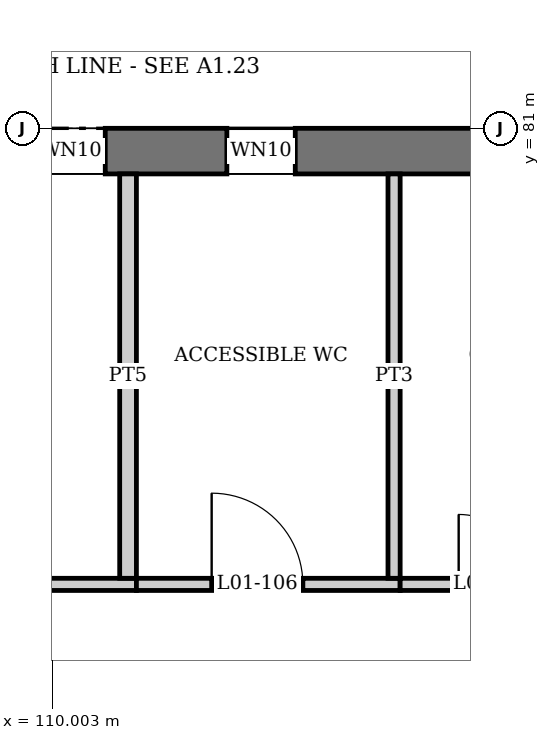
"""IFC4 building model, lengths in metres.
Left out: names, types, materials, properties, quantities, classifications, styles, units other than length and angle.
Written with IfcOpenShell. Run it as: python <this file> out.ifc"""

import sys

from ifc_helpers import new_model, si_unit, direction, frame, frame_2d, origin, place, context, subcontext, project, spatial, rectangle, extrude, element, fill, save


model = new_model("IFC4")
c1 = context("Model", 3, precision=1e-05, world=origin(), true_north=direction((0.0, 1.0)))
c2 = subcontext(c1, "Body", "Model", "MODEL_VIEW")
j1 = project(units=[si_unit("LENGTHUNIT", "METRE"), si_unit("PLANEANGLEUNIT", "RADIAN")], contexts=[c1])
p1 = place(None, origin())
s1 = spatial("IfcSite", under=j1, at=p1, CompositionType="ELEMENT")
p2 = place(p1, origin())
s2 = spatial("IfcBuilding", under=s1, at=p2, CompositionType="ELEMENT")
p3 = place(p2, frame((0.0, 0.0, 6.0)))
s3 = spatial("IfcBuildingStorey", under=s2, at=p3, CompositionType="ELEMENT", Elevation=6.0)
p4 = place(p3, frame((0.0, 80.7, 0.0), z_axis=(0.0, 0.0, 1.0), x_axis=(1.0, 0.0, 0.0)))
e1 = element("IfcWall", 1, at=p4, inside=s3, PredefinedType="SHEAR", context=c2, shape_type="SweptSolid", body=[
    extrude(rectangle(XDim=180.0, YDim=0.6, at=frame_2d((90.0, 0.0))), origin(), (0.0, 0.0, 1.0), 4.5),
])
p5 = place(p4, frame((0.9, 0.0, 0.6)))
e2 = element("IfcOpeningElement", 2, at=p5, cuts=e1, PredefinedType="OPENING", context=c2, shape_type="SweptSolid", body=[
    extrude(rectangle(XDim=2.7, YDim=2.7, at=frame_2d((1.35, 1.35))), frame((0.0, 0.31, 0.0), z_axis=(0.0, -1.0, 0.0), x_axis=(1.0, 0.0, 0.0)), (0.0, 0.0, 1.0), 0.62),
])
p6 = place(p4, frame((5.4, 0.0, 0.6)))
e3 = element("IfcOpeningElement", 3, at=p6, cuts=e1, PredefinedType="OPENING", context=c2, shape_type="SweptSolid", body=[
    extrude(rectangle(XDim=2.7, YDim=2.7, at=frame_2d((1.35, 1.35))), frame((0.0, 0.31, 0.0), z_axis=(0.0, -1.0, 0.0), x_axis=(1.0, 0.0, 0.0)), (0.0, 0.0, 1.0), 0.62),
])
p7 = place(p4, frame((9.9, 0.0, 0.6)))
e4 = element("IfcOpeningElement", 4, at=p7, cuts=e1, PredefinedType="OPENING", context=c2, shape_type="SweptSolid", body=[
    extrude(rectangle(XDim=2.7, YDim=2.7, at=frame_2d((1.35, 1.35))), frame((0.0, 0.31, 0.0), z_axis=(0.0, -1.0, 0.0), x_axis=(1.0, 0.0, 0.0)), (0.0, 0.0, 1.0), 0.62),
])
p8 = place(p4, frame((14.4, 0.0, 0.6)))
e5 = element("IfcOpeningElement", 5, at=p8, cuts=e1, PredefinedType="OPENING", context=c2, shape_type="SweptSolid", body=[
    extrude(rectangle(XDim=2.7, YDim=2.7, at=frame_2d((1.35, 1.35))), frame((0.0, 0.31, 0.0), z_axis=(0.0, -1.0, 0.0), x_axis=(1.0, 0.0, 0.0)), (0.0, 0.0, 1.0), 0.62),
])
p9 = place(p4, frame((18.9, 0.0, 0.6)))
e6 = element("IfcOpeningElement", 6, at=p9, cuts=e1, PredefinedType="OPENING", context=c2, shape_type="SweptSolid", body=[
    extrude(rectangle(XDim=2.7, YDim=2.7, at=frame_2d((1.35, 1.35))), frame((0.0, 0.31, 0.0), z_axis=(0.0, -1.0, 0.0), x_axis=(1.0, 0.0, 0.0)), (0.0, 0.0, 1.0), 0.62),
])
p10 = place(p4, frame((23.4, 0.0, 0.6)))
e7 = element("IfcOpeningElement", 7, at=p10, cuts=e1, PredefinedType="OPENING", context=c2, shape_type="SweptSolid", body=[
    extrude(rectangle(XDim=2.7, YDim=2.7, at=frame_2d((1.35, 1.35))), frame((0.0, 0.31, 0.0), z_axis=(0.0, -1.0, 0.0), x_axis=(1.0, 0.0, 0.0)), (0.0, 0.0, 1.0), 0.62),
])
p11 = place(p4, frame((37.05, 0.0, 0.9)))
e8 = element("IfcOpeningElement", 8, at=p11, cuts=e1, PredefinedType="OPENING", context=c2, shape_type="SweptSolid", body=[
    extrude(rectangle(XDim=2.4, YDim=2.1, at=frame_2d((1.2, 1.05))), frame((0.0, 0.31, 0.0), z_axis=(0.0, -1.0, 0.0), x_axis=(1.0, 0.0, 0.0)), (0.0, 0.0, 1.0), 0.62),
])
p12 = place(p4, frame((41.55, 0.0, 0.9)))
e9 = element("IfcOpeningElement", 9, at=p12, cuts=e1, PredefinedType="OPENING", context=c2, shape_type="SweptSolid", body=[
    extrude(rectangle(XDim=2.4, YDim=2.1, at=frame_2d((1.2, 1.05))), frame((0.0, 0.31, 0.0), z_axis=(0.0, -1.0, 0.0), x_axis=(1.0, 0.0, 0.0)), (0.0, 0.0, 1.0), 0.62),
])
p13 = place(p4, frame((46.05, 0.0, 0.9)))
e10 = element("IfcOpeningElement", 10, at=p13, cuts=e1, PredefinedType="OPENING", context=c2, shape_type="SweptSolid", body=[
    extrude(rectangle(XDim=2.4, YDim=2.1, at=frame_2d((1.2, 1.05))), frame((0.0, 0.31, 0.0), z_axis=(0.0, -1.0, 0.0), x_axis=(1.0, 0.0, 0.0)), (0.0, 0.0, 1.0), 0.62),
])
p14 = place(p4, frame((50.55, 0.0, 0.9)))
e11 = element("IfcOpeningElement", 11, at=p14, cuts=e1, PredefinedType="OPENING", context=c2, shape_type="SweptSolid", body=[
    extrude(rectangle(XDim=2.4, YDim=2.1, at=frame_2d((1.2, 1.05))), frame((0.0, 0.31, 0.0), z_axis=(0.0, -1.0, 0.0), x_axis=(1.0, 0.0, 0.0)), (0.0, 0.0, 1.0), 0.62),
])
p15 = place(p4, frame((55.05, 0.0, 0.9)))
e12 = element("IfcOpeningElement", 12, at=p15, cuts=e1, PredefinedType="OPENING", context=c2, shape_type="SweptSolid", body=[
    extrude(rectangle(XDim=2.4, YDim=2.1, at=frame_2d((1.2, 1.05))), frame((0.0, 0.31, 0.0), z_axis=(0.0, -1.0, 0.0), x_axis=(1.0, 0.0, 0.0)), (0.0, 0.0, 1.0), 0.62),
])
p16 = place(p4, frame((59.55, 0.0, 0.9)))
e13 = element("IfcOpeningElement", 13, at=p16, cuts=e1, PredefinedType="OPENING", context=c2, shape_type="SweptSolid", body=[
    extrude(rectangle(XDim=2.4, YDim=2.1, at=frame_2d((1.2, 1.05))), frame((0.0, 0.31, 0.0), z_axis=(0.0, -1.0, 0.0), x_axis=(1.0, 0.0, 0.0)), (0.0, 0.0, 1.0), 0.62),
])
p17 = place(p4, frame((64.8, 0.0, 1.7)))
e14 = element("IfcOpeningElement", 14, at=p17, cuts=e1, PredefinedType="OPENING", context=c2, shape_type="SweptSolid", body=[
    extrude(rectangle(XDim=0.9, YDim=0.6, at=frame_2d((0.45, 0.3))), frame((0.0, 0.31, 0.0), z_axis=(0.0, -1.0, 0.0), x_axis=(1.0, 0.0, 0.0)), (0.0, 0.0, 1.0), 0.62),
])
p18 = place(p4, frame((69.3, 0.0, 1.7)))
e15 = element("IfcOpeningElement", 15, at=p18, cuts=e1, PredefinedType="OPENING", context=c2, shape_type="SweptSolid", body=[
    extrude(rectangle(XDim=0.9, YDim=0.6, at=frame_2d((0.45, 0.3))), frame((0.0, 0.31, 0.0), z_axis=(0.0, -1.0, 0.0), x_axis=(1.0, 0.0, 0.0)), (0.0, 0.0, 1.0), 0.62),
])
p19 = place(p4, frame((73.8, 0.0, 1.7)))
e16 = element("IfcOpeningElement", 16, at=p19, cuts=e1, PredefinedType="OPENING", context=c2, shape_type="SweptSolid", body=[
    extrude(rectangle(XDim=0.9, YDim=0.6, at=frame_2d((0.45, 0.3))), frame((0.0, 0.31, 0.0), z_axis=(0.0, -1.0, 0.0), x_axis=(1.0, 0.0, 0.0)), (0.0, 0.0, 1.0), 0.62),
])
p20 = place(p4, frame((90.9, 0.0, 0.6)))
e17 = element("IfcOpeningElement", 17, at=p20, cuts=e1, PredefinedType="OPENING", context=c2, shape_type="SweptSolid", body=[
    extrude(rectangle(XDim=2.7, YDim=2.7, at=frame_2d((1.35, 1.35))), frame((0.0, 0.31, 0.0), z_axis=(0.0, -1.0, 0.0), x_axis=(1.0, 0.0, 0.0)), (0.0, 0.0, 1.0), 0.62),
])
p21 = place(p4, frame((95.4, 0.0, 0.6)))
e18 = element("IfcOpeningElement", 18, at=p21, cuts=e1, PredefinedType="OPENING", context=c2, shape_type="SweptSolid", body=[
    extrude(rectangle(XDim=2.7, YDim=2.7, at=frame_2d((1.35, 1.35))), frame((0.0, 0.31, 0.0), z_axis=(0.0, -1.0, 0.0), x_axis=(1.0, 0.0, 0.0)), (0.0, 0.0, 1.0), 0.62),
])
p22 = place(p4, frame((100.8, 0.0, 1.7)))
e19 = element("IfcOpeningElement", 19, at=p22, cuts=e1, PredefinedType="OPENING", context=c2, shape_type="SweptSolid", body=[
    extrude(rectangle(XDim=0.9, YDim=0.6, at=frame_2d((0.45, 0.3))), frame((0.0, 0.31, 0.0), z_axis=(0.0, -1.0, 0.0), x_axis=(1.0, 0.0, 0.0)), (0.0, 0.0, 1.0), 0.62),
])
p23 = place(p4, frame((105.3, 0.0, 1.7)))
e20 = element("IfcOpeningElement", 20, at=p23, cuts=e1, PredefinedType="OPENING", context=c2, shape_type="SweptSolid", body=[
    extrude(rectangle(XDim=0.9, YDim=0.6, at=frame_2d((0.45, 0.3))), frame((0.0, 0.31, 0.0), z_axis=(0.0, -1.0, 0.0), x_axis=(1.0, 0.0, 0.0)), (0.0, 0.0, 1.0), 0.62),
])
p24 = place(p4, frame((109.8, 0.0, 1.7)))
e21 = element("IfcOpeningElement", 21, at=p24, cuts=e1, PredefinedType="OPENING", context=c2, shape_type="SweptSolid", body=[
    extrude(rectangle(XDim=0.9, YDim=0.6, at=frame_2d((0.45, 0.3))), frame((0.0, 0.31, 0.0), z_axis=(0.0, -1.0, 0.0), x_axis=(1.0, 0.0, 0.0)), (0.0, 0.0, 1.0), 0.62),
])
p25 = place(p4, frame((154.05, 0.0, 0.9)))
e22 = element("IfcOpeningElement", 22, at=p25, cuts=e1, PredefinedType="OPENING", context=c2, shape_type="SweptSolid", body=[
    extrude(rectangle(XDim=2.4, YDim=2.1, at=frame_2d((1.2, 1.05))), frame((0.0, 0.31, 0.0), z_axis=(0.0, -1.0, 0.0), x_axis=(1.0, 0.0, 0.0)), (0.0, 0.0, 1.0), 0.62),
])
p26 = place(p4, frame((158.55, 0.0, 0.9)))
e23 = element("IfcOpeningElement", 23, at=p26, cuts=e1, PredefinedType="OPENING", context=c2, shape_type="SweptSolid", body=[
    extrude(rectangle(XDim=2.4, YDim=2.1, at=frame_2d((1.2, 1.05))), frame((0.0, 0.31, 0.0), z_axis=(0.0, -1.0, 0.0), x_axis=(1.0, 0.0, 0.0)), (0.0, 0.0, 1.0), 0.62),
])
p27 = place(p4, frame((163.8, 0.0, 1.7)))
e24 = element("IfcOpeningElement", 24, at=p27, cuts=e1, PredefinedType="OPENING", context=c2, shape_type="SweptSolid", body=[
    extrude(rectangle(XDim=0.9, YDim=0.6, at=frame_2d((0.45, 0.3))), frame((0.0, 0.31, 0.0), z_axis=(0.0, -1.0, 0.0), x_axis=(1.0, 0.0, 0.0)), (0.0, 0.0, 1.0), 0.62),
])
p28 = place(p4, frame((168.3, 0.0, 1.7)))
e25 = element("IfcOpeningElement", 25, at=p28, cuts=e1, PredefinedType="OPENING", context=c2, shape_type="SweptSolid", body=[
    extrude(rectangle(XDim=0.9, YDim=0.6, at=frame_2d((0.45, 0.3))), frame((0.0, 0.31, 0.0), z_axis=(0.0, -1.0, 0.0), x_axis=(1.0, 0.0, 0.0)), (0.0, 0.0, 1.0), 0.62),
])
p29 = place(p4, frame((71.55, 0.0, 1.7)))
e26 = element("IfcOpeningElement", 26, at=p29, cuts=e1, PredefinedType="OPENING", context=c2, shape_type="SweptSolid", body=[
    extrude(rectangle(XDim=0.9, YDim=0.6, at=frame_2d((0.45, 0.3))), frame((0.0, 0.31, 0.0), z_axis=(0.0, -1.0, 0.0), x_axis=(1.0, 0.0, 0.0)), (0.0, 0.0, 1.0), 0.62),
])
p30 = place(p4, frame((76.3, 0.0, 1.7)))
e27 = element("IfcOpeningElement", 27, at=p30, cuts=e1, PredefinedType="OPENING", context=c2, shape_type="SweptSolid", body=[
    extrude(rectangle(XDim=0.9, YDim=0.6, at=frame_2d((0.45, 0.3))), frame((0.0, 0.31, 0.0), z_axis=(0.0, -1.0, 0.0), x_axis=(1.0, 0.0, 0.0)), (0.0, 0.0, 1.0), 0.62),
])
p31 = place(p4, frame((107.55, 0.0, 1.7)))
e28 = element("IfcOpeningElement", 28, at=p31, cuts=e1, PredefinedType="OPENING", context=c2, shape_type="SweptSolid", body=[
    extrude(rectangle(XDim=0.9, YDim=0.6, at=frame_2d((0.45, 0.3))), frame((0.0, 0.31, 0.0), z_axis=(0.0, -1.0, 0.0), x_axis=(1.0, 0.0, 0.0)), (0.0, 0.0, 1.0), 0.62),
])
p32 = place(p4, frame((112.3, 0.0, 1.7)))
e29 = element("IfcOpeningElement", 29, at=p32, cuts=e1, PredefinedType="OPENING", context=c2, shape_type="SweptSolid", body=[
    extrude(rectangle(XDim=0.9, YDim=0.6, at=frame_2d((0.45, 0.3))), frame((0.0, 0.31, 0.0), z_axis=(0.0, -1.0, 0.0), x_axis=(1.0, 0.0, 0.0)), (0.0, 0.0, 1.0), 0.62),
])
p33 = place(p4, frame((166.05, 0.0, 1.7)))
e30 = element("IfcOpeningElement", 30, at=p33, cuts=e1, PredefinedType="OPENING", context=c2, shape_type="SweptSolid", body=[
    extrude(rectangle(XDim=0.9, YDim=0.6, at=frame_2d((0.45, 0.3))), frame((0.0, 0.31, 0.0), z_axis=(0.0, -1.0, 0.0), x_axis=(1.0, 0.0, 0.0)), (0.0, 0.0, 1.0), 0.62),
])
p34 = place(p3, frame((98.92, 75.0, 0.0), z_axis=(0.0, 0.0, 1.0), x_axis=(1.0, 0.0, 0.0)))
e31 = element("IfcWall", 31, at=p34, inside=s3, PredefinedType="PARTITIONING", context=c2, shape_type="SweptSolid", body=[
    extrude(rectangle(XDim=12.19, YDim=0.16, at=frame_2d((6.095, 0.0))), origin(), (0.0, 0.0, 1.0), 3.998),
])
p35 = place(p34, frame((2.68, 0.0, 0.0)))
e32 = element("IfcOpeningElement", 32, at=p35, cuts=e31, PredefinedType="OPENING", context=c2, shape_type="SweptSolid", body=[
    extrude(rectangle(XDim=1.0, YDim=2.1, at=frame_2d((0.5, 1.05))), frame((0.0, 0.09, 0.0), z_axis=(0.0, -1.0, 0.0), x_axis=(1.0, 0.0, 0.0)), (0.0, 0.0, 1.0), 0.18),
])
p36 = place(p34, frame((8.68, 0.0, 0.0)))
e33 = element("IfcOpeningElement", 33, at=p36, cuts=e31, PredefinedType="OPENING", context=c2, shape_type="SweptSolid", body=[
    extrude(rectangle(XDim=1.0, YDim=2.1, at=frame_2d((0.5, 1.05))), frame((0.0, 0.09, 0.0), z_axis=(0.0, -1.0, 0.0), x_axis=(1.0, 0.0, 0.0)), (0.0, 0.0, 1.0), 0.18),
])
p37 = place(p3, frame((111.11, 75.0, 0.0), z_axis=(0.0, 0.0, 1.0), x_axis=(1.0, 0.0, 0.0)))
e34 = element("IfcWall", 34, at=p37, inside=s3, PredefinedType="PARTITIONING", context=c2, shape_type="SweptSolid", body=[
    extrude(rectangle(XDim=3.47, YDim=0.16, at=frame_2d((1.735, 0.0))), origin(), (0.0, 0.0, 1.0), 4.102),
])
p38 = place(p37, frame((0.99, 0.0, 0.0)))
e35 = element("IfcOpeningElement", 35, at=p38, cuts=e34, PredefinedType="OPENING", context=c2, shape_type="SweptSolid", body=[
    extrude(rectangle(XDim=1.2, YDim=2.1, at=frame_2d((0.6, 1.05))), frame((0.0, 0.09, 0.0), z_axis=(0.0, -1.0, 0.0), x_axis=(1.0, 0.0, 0.0)), (0.0, 0.0, 1.0), 0.18),
])
p39 = place(p3, frame((114.58, 75.0, 0.0), z_axis=(0.0, 0.0, 1.0), x_axis=(1.0, 0.0, 0.0)))
e36 = element("IfcWall", 36, at=p39, inside=s3, PredefinedType="PARTITIONING", context=c2, shape_type="SweptSolid", body=[
    extrude(rectangle(XDim=2.42, YDim=0.16, at=frame_2d((1.21, 0.0))), origin(), (0.0, 0.0, 1.0), 4.35),
])
p40 = place(p39, frame((0.77, 0.0, 0.0)))
e37 = element("IfcOpeningElement", 37, at=p40, cuts=e36, PredefinedType="OPENING", context=c2, shape_type="SweptSolid", body=[
    extrude(rectangle(XDim=0.92, YDim=2.1, at=frame_2d((0.46, 1.05))), frame((0.0, 0.09, 0.0), z_axis=(0.0, -1.0, 0.0), x_axis=(1.0, 0.0, 0.0)), (0.0, 0.0, 1.0), 0.18),
])
p41 = place(p3, frame((111.0, 75.08, 0.0), z_axis=(0.0, 0.0, 1.0), x_axis=(0.0, 1.0, 0.0)))
e38 = element("IfcWall", 38, at=p41, inside=s3, PredefinedType="PLUMBINGWALL", context=c2, shape_type="SweptSolid", body=[
    extrude(rectangle(XDim=5.32, YDim=0.22, at=frame_2d((2.66, 0.0))), origin(), (0.0, 0.0, 1.0), 3.35),
])
p42 = place(p3, frame((114.5, 75.08, 0.0), z_axis=(0.0, 0.0, 1.0), x_axis=(0.0, 1.0, 0.0)))
e39 = element("IfcWall", 39, at=p42, inside=s3, PredefinedType="PARTITIONING", context=c2, shape_type="SweptSolid", body=[
    extrude(rectangle(XDim=5.32, YDim=0.16, at=frame_2d((2.66, 0.0))), origin(), (0.0, 0.0, 1.0), 3.35),
])
p43 = place(p24, origin())
e40 = element("IfcWindow", 40, at=p43, inside=s3, PartitioningType="SINGLE_PANEL", PredefinedType="WINDOW", context=c2, shape_type="SweptSolid", body=[
    extrude(rectangle(XDim=0.9, YDim=0.6, at=frame_2d((0.45, 0.3))), frame((0.0, 0.03, 0.0), z_axis=(0.0, -1.0, 0.0), x_axis=(1.0, 0.0, 0.0)), (0.0, 0.0, 1.0), 0.06),
])
fill(e21, e40)
p44 = place(p32, origin())
e41 = element("IfcWindow", 41, at=p44, inside=s3, PartitioningType="SINGLE_PANEL", PredefinedType="WINDOW", context=c2, shape_type="SweptSolid", body=[
    extrude(rectangle(XDim=0.9, YDim=0.6, at=frame_2d((0.45, 0.3))), frame((0.0, 0.03, 0.0), z_axis=(0.0, -1.0, 0.0), x_axis=(1.0, 0.0, 0.0)), (0.0, 0.0, 1.0), 0.06),
])
fill(e29, e41)
p45 = place(p38, origin())
e42 = element("IfcDoor", 42, at=p45, inside=s3, OperationType="SINGLE_SWING_LEFT", PredefinedType="DOOR", context=c2, shape_type="SweptSolid", body=[
    extrude(rectangle(XDim=1.2, YDim=2.1, at=frame_2d((0.6, 1.05))), frame((0.0, 0.025, 0.0), z_axis=(0.0, -1.0, 0.0), x_axis=(1.0, 0.0, 0.0)), (0.0, 0.0, 1.0), 0.05),
])
fill(e35, e42)
p46 = place(p40, origin())
e43 = element("IfcDoor", 43, at=p46, inside=s3, OperationType="SINGLE_SWING_LEFT", PredefinedType="DOOR", context=c2, shape_type="SweptSolid", body=[
    extrude(rectangle(XDim=0.92, YDim=2.1, at=frame_2d((0.46, 1.05))), frame((0.0, 0.025, 0.0), z_axis=(0.0, -1.0, 0.0), x_axis=(1.0, 0.0, 0.0)), (0.0, 0.0, 1.0), 0.05),
])
fill(e37, e43)
save(model, sys.argv[1])
